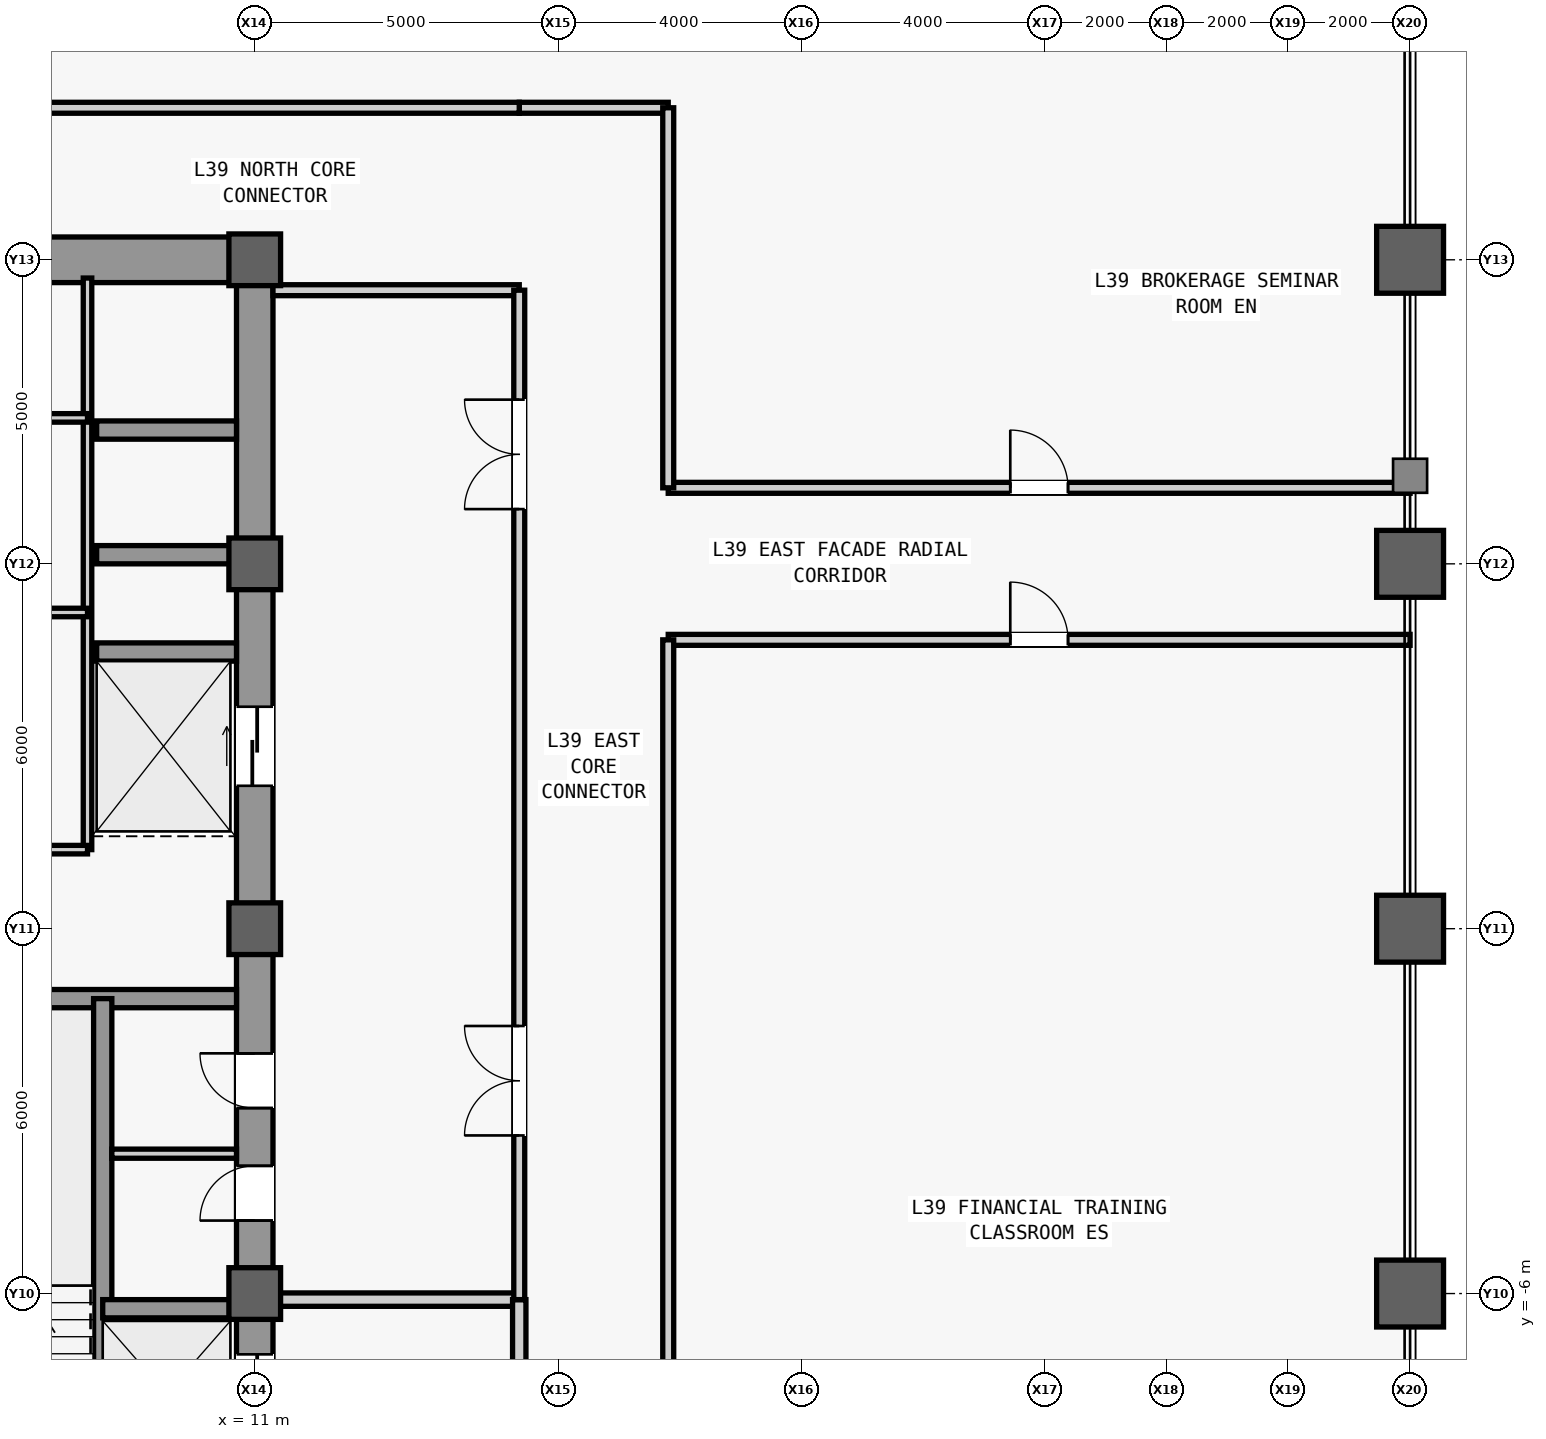
"""IFC4 building model, lengths in metres.
Left out: names, types, materials, properties, quantities, classifications, styles, units other than length and angle.
Written with IfcOpenShell. Run it as: python <this file> out.ifc"""

import sys

from ifc_helpers import new_model, si_unit, direction, frame, frame_2d, origin, origin_2d, place, context, subcontext, project, spatial, rectangle, hollow_rectangle, extrude, source, transform, mapped, element, fill, save


model = new_model("IFC4")
c1 = context("Model", 3, precision=1e-05, world=origin(), true_north=direction((0.0, 1.0)))
c2 = subcontext(c1, "Body", "Model", "MODEL_VIEW")
j1 = project(units=[si_unit("LENGTHUNIT", "METRE"), si_unit("PLANEANGLEUNIT", "RADIAN")], contexts=[c1])
p1 = place(None, origin())
s1 = spatial("IfcSite", under=j1, at=p1, CompositionType="ELEMENT")
p2 = place(p1, origin())
s2 = spatial("IfcBuilding", under=s1, at=p2, CompositionType="ELEMENT")
p3 = place(p2, frame((0.0, 0.0, 171.1)))
s3 = spatial("IfcBuildingStorey", under=s2, at=p3, CompositionType="ELEMENT", Elevation=171.1)
m1 = source(origin(), c2, "Body", "SweptSolid", [
    extrude(rectangle(XDim=22.0, YDim=0.6, at=frame_2d((11.0, 0.0))), origin(), (0.0, 0.0, 1.0), 3.78),
])
p4 = place(p3, frame((11.0, -11.0, 0.0), z_axis=(0.0, 0.0, 1.0), x_axis=(0.0, 1.0, 0.0)))
e1 = element("IfcWall", 1, at=p4, inside=s3, PredefinedType="SHEAR", context=c2, shape_type="MappedRepresentation", body=[
    mapped(m1, transform((0.0, 0.0, 0.0), scale=1.0)),
])
m2 = source(origin(), c2, "Body", "SweptSolid", [
    extrude(rectangle(XDim=1.1, YDim=2.2, at=frame_2d((0.55, 1.1))), frame((0.0, 0.31, 0.0), z_axis=(0.0, -1.0, 0.0), x_axis=(1.0, 0.0, 0.0)), (0.0, 0.0, 1.0), 0.62),
])
p5 = place(p4, frame((0.8, 0.0, 0.0)))
e2 = element("IfcOpeningElement", 2, at=p5, cuts=e1, PredefinedType="OPENING", context=c2, shape_type="MappedRepresentation", body=[
    mapped(m2, transform((0.0, 0.0, 0.0), scale=1.0)),
])
m3 = source(origin(), c2, "Body", "SweptSolid", [
    extrude(rectangle(XDim=0.9, YDim=2.15, at=frame_2d((0.45, 1.075))), frame((0.0, 0.31, 0.0), z_axis=(0.0, -1.0, 0.0), x_axis=(1.0, 0.0, 0.0)), (0.0, 0.0, 1.0), 0.62),
])
p6 = place(p4, frame((6.2, 0.0, 0.0)))
e3 = element("IfcOpeningElement", 3, at=p6, cuts=e1, PredefinedType="OPENING", context=c2, shape_type="MappedRepresentation", body=[
    mapped(m3, transform((0.0, 0.0, 0.0), scale=1.0)),
])
p7 = place(p4, frame((8.05, 0.0, 0.0)))
e4 = element("IfcOpeningElement", 4, at=p7, cuts=e1, PredefinedType="OPENING", context=c2, shape_type="MappedRepresentation", body=[
    mapped(m3, transform((0.0, 0.0, 0.0), scale=1.0)),
])
m4 = source(origin(), c2, "Body", "SweptSolid", [
    extrude(rectangle(XDim=1.3, YDim=2.3, at=frame_2d((0.65, 1.15))), frame((0.0, 0.31, 0.0), z_axis=(0.0, -1.0, 0.0), x_axis=(1.0, 0.0, 0.0)), (0.0, 0.0, 1.0), 0.62),
])
p8 = place(p4, frame((2.7, 0.0, 0.0)))
e5 = element("IfcOpeningElement", 5, at=p8, cuts=e1, PredefinedType="OPENING", context=c2, shape_type="MappedRepresentation", body=[
    mapped(m4, transform((0.0, 0.0, 0.0), scale=1.0)),
])
p9 = place(p4, frame((13.35, 0.0, 0.0)))
e6 = element("IfcOpeningElement", 6, at=p9, cuts=e1, PredefinedType="OPENING", context=c2, shape_type="MappedRepresentation", body=[
    mapped(m4, transform((0.0, 0.0, 0.0), scale=1.0)),
])
m5 = source(origin(), c2, "Body", "SweptSolid", [
    extrude(rectangle(XDim=5.85, YDim=0.75, at=frame_2d((2.925, 0.0))), origin(), (0.0, 0.0, 1.0), 3.78),
])
p10 = place(p3, frame((4.85, 11.0, 0.0), z_axis=(0.0, 0.0, 1.0), x_axis=(1.0, 0.0, 0.0)))
e7 = element("IfcWall", 7, at=p10, inside=s3, PredefinedType="SHEAR", context=c2, shape_type="MappedRepresentation", body=[
    mapped(m5, transform((0.0, 0.0, 0.0), scale=1.0)),
])
m6 = source(origin(), c2, "Body", "SweptSolid", [
    extrude(rectangle(XDim=1.05, YDim=2.2, at=frame_2d((0.525, 1.1))), frame((0.0, 0.385, 0.0), z_axis=(0.0, -1.0, 0.0), x_axis=(1.0, 0.0, 0.0)), (0.0, 0.0, 1.0), 0.77),
])
p11 = place(p10, frame((1.375, 0.0, 0.0)))
e8 = element("IfcOpeningElement", 8, at=p11, cuts=e7, PredefinedType="OPENING", context=c2, shape_type="MappedRepresentation", body=[
    mapped(m6, transform((0.0, 0.0, 0.0), scale=1.0)),
])
m7 = source(origin(), c2, "Body", "SweptSolid", [
    extrude(rectangle(XDim=5.6, YDim=0.3, at=frame_2d((2.8, 0.0))), origin(), (0.0, 0.0, 1.0), 3.78),
])
p12 = place(p3, frame((5.1, -1.15, 0.0), z_axis=(0.0, 0.0, 1.0), x_axis=(1.0, 0.0, 0.0)))
e9 = element("IfcWall", 9, at=p12, inside=s3, PredefinedType="SHEAR", context=c2, shape_type="MappedRepresentation", body=[
    mapped(m7, transform((0.0, 0.0, 0.0), scale=1.0)),
])
m8 = source(origin(), c2, "Body", "SweptSolid", [
    extrude(rectangle(XDim=0.85, YDim=0.85, at=origin_2d()), origin(), (0.0, 0.0, 1.0), 4.0),
])
for number, where, z_axis, x_axis in (
    (10, (11.0, -6.0, 0.0), (0.0, 0.0, 1.0), (1.0, 0.0, 0.0)),
    (11, (11.0, 0.0, 0.0), (0.0, 0.0, 1.0), (1.0, 0.0, 0.0)),
    (12, (11.0, 6.0, 0.0), (0.0, 0.0, 1.0), (1.0, 0.0, 0.0)),
    (13, (11.0, 11.0, 0.0), (0.0, 0.0, 1.0), (1.0, 0.0, 0.0)),
):
    element("IfcColumn", number, at=place(p3, frame(where, z_axis=z_axis, x_axis=x_axis)), inside=s3, PredefinedType="COLUMN", context=c2, shape_type="MappedRepresentation", body=[
        mapped(m8, transform((0.0, 0.0, 0.0), scale=1.0)),
    ])
m9 = source(origin(), c2, "Body", "SweptSolid", [
    extrude(hollow_rectangle(XDim=1.1, YDim=1.1, WallThickness=0.06, at=origin_2d()), origin(), (0.0, 0.0, 1.0), 4.0),
])
for number, where, z_axis, x_axis in (
    (14, (30.0, -6.0, 0.0), (0.0, 0.0, 1.0), (1.0, 0.0, 0.0)),
    (15, (30.0, 0.0, 0.0), (0.0, 0.0, 1.0), (1.0, 0.0, 0.0)),
    (16, (30.0, 6.0, 0.0), (0.0, 0.0, 1.0), (1.0, 0.0, 0.0)),
    (17, (30.0, 11.0, 0.0), (0.0, 0.0, 1.0), (1.0, 0.0, 0.0)),
):
    element("IfcColumn", number, at=place(p3, frame(where, z_axis=z_axis, x_axis=x_axis)), inside=s3, PredefinedType="COLUMN", context=c2, shape_type="MappedRepresentation", body=[
        mapped(m9, transform((0.0, 0.0, 0.0), scale=1.0)),
    ])
m10 = source(origin(), c2, "Body", "SweptSolid", [
    extrude(rectangle(XDim=7.8, YDim=0.3, at=frame_2d((3.9, 0.0))), origin(), (0.0, 0.0, 1.0), 3.78),
])
p13 = place(p3, frame((8.5, -8.95, 0.0), z_axis=(0.0, 0.0, 1.0), x_axis=(0.0, 1.0, 0.0)))
e18 = element("IfcWall", 18, at=p13, inside=s3, PredefinedType="SHEAR", context=c2, shape_type="MappedRepresentation", body=[
    mapped(m10, transform((0.0, 0.0, 0.0), scale=1.0)),
])
m11 = source(origin(), c2, "Body", "SweptSolid", [
    extrude(rectangle(XDim=2.2, YDim=0.3, at=frame_2d((1.1, 0.0))), origin(), (0.0, 0.0, 1.0), 3.78),
])
p14 = place(p3, frame((8.5, -6.25, 0.0), z_axis=(0.0, 0.0, 1.0), x_axis=(1.0, 0.0, 0.0)))
e19 = element("IfcWall", 19, at=p14, inside=s3, PredefinedType="SHEAR", context=c2, shape_type="MappedRepresentation", body=[
    mapped(m11, transform((0.0, 0.0, 0.0), scale=1.0)),
])
m12 = source(origin(), c2, "Body", "SweptSolid", [
    extrude(rectangle(XDim=2.3, YDim=0.3, at=frame_2d((1.15, 0.0))), origin(), (0.0, 0.0, 1.0), 3.78),
])
for number, where, z_axis, x_axis in (
    (20, (8.4, 4.55, 0.0), (0.0, 0.0, 1.0), (1.0, 0.0, 0.0)),
    (21, (8.4, 6.15, 0.0), (0.0, 0.0, 1.0), (1.0, 0.0, 0.0)),
    (22, (8.4, 8.2, 0.0), (0.0, 0.0, 1.0), (1.0, 0.0, 0.0)),
):
    element("IfcWall", number, at=place(p3, frame(where, z_axis=z_axis, x_axis=x_axis)), inside=s3, PredefinedType="SHEAR", context=c2, shape_type="MappedRepresentation", body=[
        mapped(m12, transform((0.0, 0.0, 0.0), scale=1.0)),
    ])
m13 = source(origin(), c2, "Body", "SweptSolid", [
    extrude(rectangle(XDim=2.05, YDim=0.15, at=frame_2d((1.025, 0.0))), origin(), (0.0, 0.0, 1.0), 3.78),
])
p15 = place(p3, frame((8.65, -3.7, 0.0), z_axis=(0.0, 0.0, 1.0), x_axis=(1.0, 0.0, 0.0)))
e23 = element("IfcWall", 23, at=p15, inside=s3, PredefinedType="PARTITIONING", context=c2, shape_type="MappedRepresentation", body=[
    mapped(m13, transform((0.0, 0.0, 0.0), scale=1.0)),
])
m14 = source(origin(), c2, "Body", "SweptSolid", [
    extrude(rectangle(XDim=9.4, YDim=0.14, at=frame_2d((4.7, 0.0))), origin(), (0.0, 0.0, 1.0), 3.78),
])
p16 = place(p3, frame((8.25, 1.3, 0.0), z_axis=(0.0, 0.0, 1.0), x_axis=(0.0, 1.0, 0.0)))
e24 = element("IfcWall", 24, at=p16, inside=s3, PredefinedType="PARTITIONING", context=c2, shape_type="MappedRepresentation", body=[
    mapped(m14, transform((0.0, 0.0, 0.0), scale=1.0)),
])
m15 = source(origin(), c2, "Body", "SweptSolid", [
    extrude(rectangle(XDim=3.15, YDim=0.14, at=frame_2d((1.575, 0.0))), origin(), (0.0, 0.0, 1.0), 3.78),
])
p17 = place(p3, frame((5.1, 1.3, 0.0), z_axis=(0.0, 0.0, 1.0), x_axis=(1.0, 0.0, 0.0)))
e25 = element("IfcWall", 25, at=p17, inside=s3, PredefinedType="PARTITIONING", context=c2, shape_type="MappedRepresentation", body=[
    mapped(m15, transform((0.0, 0.0, 0.0), scale=1.0)),
])
p18 = place(p3, frame((5.1, 8.4, 0.0), z_axis=(0.0, 0.0, 1.0), x_axis=(1.0, 0.0, 0.0)))
e26 = element("IfcWall", 26, at=p18, inside=s3, PredefinedType="PARTITIONING", context=c2, shape_type="MappedRepresentation", body=[
    mapped(m15, transform((0.0, 0.0, 0.0), scale=1.0)),
])
m16 = source(origin(), c2, "Body", "SweptSolid", [
    extrude(rectangle(XDim=0.9, YDim=2.15, at=frame_2d((0.45, 1.075))), frame((0.0, 0.08, 0.0), z_axis=(0.0, -1.0, 0.0), x_axis=(1.0, 0.0, 0.0)), (0.0, 0.0, 1.0), 0.16),
])
p19 = place(p18, frame((1.13, 0.0, 0.0)))
e27 = element("IfcOpeningElement", 27, at=p19, cuts=e26, PredefinedType="OPENING", context=c2, shape_type="MappedRepresentation", body=[
    mapped(m16, transform((0.0, 0.0, 0.0), scale=1.0)),
])
p20 = place(p3, frame((5.1, 5.2, 0.0), z_axis=(0.0, 0.0, 1.0), x_axis=(1.0, 0.0, 0.0)))
e28 = element("IfcWall", 28, at=p20, inside=s3, PredefinedType="PARTITIONING", context=c2, shape_type="MappedRepresentation", body=[
    mapped(m15, transform((0.0, 0.0, 0.0), scale=1.0)),
])
p21 = place(p20, frame((1.13, 0.0, 0.0)))
e29 = element("IfcOpeningElement", 29, at=p21, cuts=e28, PredefinedType="OPENING", context=c2, shape_type="MappedRepresentation", body=[
    mapped(m16, transform((0.0, 0.0, 0.0), scale=1.0)),
])
m17 = source(origin(), c2, "Body", "SweptSolid", [
    extrude(rectangle(XDim=4.05, YDim=0.22, at=frame_2d((2.025, 0.0))), origin(), (0.0, 0.0, 1.0), 3.007),
])
p22 = place(p3, frame((11.3, -6.1, 0.0), z_axis=(0.0, 0.0, 1.0), x_axis=(1.0, 0.0, 0.0)))
e30 = element("IfcWall", 30, at=p22, inside=s3, PredefinedType="PARTITIONING", context=c2, shape_type="MappedRepresentation", body=[
    mapped(m17, transform((0.0, 0.0, 0.0), scale=1.0)),
])
m18 = source(origin(), c2, "Body", "SweptSolid", [
    extrude(rectangle(XDim=4.4, YDim=0.22, at=frame_2d((2.2, 0.0))), origin(), (0.0, 0.0, 1.0), 3.78),
])
p23 = place(p3, frame((15.35, -10.5, 0.0), z_axis=(0.0, 0.0, 1.0), x_axis=(0.0, 1.0, 0.0)))
e31 = element("IfcWall", 31, at=p23, inside=s3, PredefinedType="PARTITIONING", context=c2, shape_type="MappedRepresentation", body=[
    mapped(m18, transform((0.0, 0.0, 0.0), scale=1.0)),
])
m19 = source(origin(), c2, "Body", "SweptSolid", [
    extrude(rectangle(XDim=1.2, YDim=2.2, at=frame_2d((0.6, 1.1))), frame((0.0, 0.12, 0.0), z_axis=(0.0, -1.0, 0.0), x_axis=(1.0, 0.0, 0.0)), (0.0, 0.0, 1.0), 0.24),
])
p24 = place(p23, frame((1.6, 0.0, 0.0)))
e32 = element("IfcOpeningElement", 32, at=p24, cuts=e31, PredefinedType="OPENING", context=c2, shape_type="MappedRepresentation", body=[
    mapped(m19, transform((0.0, 0.0, 0.0), scale=1.0)),
])
m20 = source(origin(), c2, "Body", "SweptSolid", [
    extrude(rectangle(XDim=4.05, YDim=0.18, at=frame_2d((2.025, 0.0))), origin(), (0.0, 0.0, 1.0), 3.78),
])
p25 = place(p3, frame((11.3, 10.5, 0.0), z_axis=(0.0, 0.0, 1.0), x_axis=(1.0, 0.0, 0.0)))
e33 = element("IfcWall", 33, at=p25, inside=s3, PredefinedType="PARTITIONING", context=c2, shape_type="MappedRepresentation", body=[
    mapped(m20, transform((0.0, 0.0, 0.0), scale=1.0)),
])
m21 = source(origin(), c2, "Body", "SweptSolid", [
    extrude(rectangle(XDim=16.6, YDim=0.18, at=frame_2d((8.3, 0.0))), origin(), (0.0, 0.0, 1.0), 3.78),
])
p26 = place(p3, frame((15.35, -6.1, 0.0), z_axis=(0.0, 0.0, 1.0), x_axis=(0.0, 1.0, 0.0)))
e34 = element("IfcWall", 34, at=p26, inside=s3, PredefinedType="PARTITIONING", context=c2, shape_type="MappedRepresentation", body=[
    mapped(m21, transform((0.0, 0.0, 0.0), scale=1.0)),
])
m22 = source(origin(), c2, "Body", "SweptSolid", [
    extrude(rectangle(XDim=1.8, YDim=2.25, at=frame_2d((0.9, 1.125))), frame((0.0, 0.1, 0.0), z_axis=(0.0, -1.0, 0.0), x_axis=(1.0, 0.0, 0.0)), (0.0, 0.0, 1.0), 0.2),
])
p27 = place(p26, frame((2.7, 0.0, 0.0)))
e35 = element("IfcOpeningElement", 35, at=p27, cuts=e34, PredefinedType="OPENING", context=c2, shape_type="MappedRepresentation", body=[
    mapped(m22, transform((0.0, 0.0, 0.0), scale=1.0)),
])
p28 = place(p26, frame((13.0, 0.0, 0.0)))
e36 = element("IfcOpeningElement", 36, at=p28, cuts=e34, PredefinedType="OPENING", context=c2, shape_type="MappedRepresentation", body=[
    mapped(m22, transform((0.0, 0.0, 0.0), scale=1.0)),
])
m23 = source(origin(), c2, "Body", "SweptSolid", [
    extrude(rectangle(XDim=2.45, YDim=0.18, at=frame_2d((1.225, 0.0))), origin(), (0.0, 0.0, 1.0), 3.78),
])
p29 = place(p3, frame((15.35, 13.5, 0.0), z_axis=(0.0, 0.0, 1.0), x_axis=(1.0, 0.0, 0.0)))
e37 = element("IfcWall", 37, at=p29, inside=s3, PredefinedType="PARTITIONING", context=c2, shape_type="MappedRepresentation", body=[
    mapped(m23, transform((0.0, 0.0, 0.0), scale=1.0)),
])
m24 = source(origin(), c2, "Body", "SweptSolid", [
    extrude(rectangle(XDim=7.85, YDim=0.18, at=frame_2d((3.925, 0.0))), origin(), (0.0, 0.0, 1.0), 3.78),
])
p30 = place(p3, frame((7.5, 13.5, 0.0), z_axis=(0.0, 0.0, 1.0), x_axis=(1.0, 0.0, 0.0)))
e38 = element("IfcWall", 38, at=p30, inside=s3, PredefinedType="PARTITIONING", context=c2, shape_type="MappedRepresentation", body=[
    mapped(m24, transform((0.0, 0.0, 0.0), scale=1.0)),
])
m25 = source(origin(), c2, "Body", "SweptSolid", [
    extrude(rectangle(XDim=12.2, YDim=0.18, at=frame_2d((6.1, 0.0))), origin(), (0.0, 0.0, 1.0), 3.78),
])
p31 = place(p3, frame((17.8, 4.75, 0.0), z_axis=(0.0, 0.0, 1.0), x_axis=(1.0, 0.0, 0.0)))
e39 = element("IfcWall", 39, at=p31, inside=s3, PredefinedType="PARTITIONING", context=c2, shape_type="MappedRepresentation", body=[
    mapped(m25, transform((0.0, 0.0, 0.0), scale=1.0)),
])
m26 = source(origin(), c2, "Body", "SweptSolid", [
    extrude(rectangle(XDim=0.95, YDim=2.15, at=frame_2d((0.475, 1.075))), frame((0.0, 0.1, 0.0), z_axis=(0.0, -1.0, 0.0), x_axis=(1.0, 0.0, 0.0)), (0.0, 0.0, 1.0), 0.2),
])
p32 = place(p31, frame((5.625, 0.0, 0.0)))
e40 = element("IfcOpeningElement", 40, at=p32, cuts=e39, PredefinedType="OPENING", context=c2, shape_type="MappedRepresentation", body=[
    mapped(m26, transform((0.0, 0.0, 0.0), scale=1.0)),
])
m27 = source(origin(), c2, "Body", "SweptSolid", [
    extrude(rectangle(XDim=18.95, YDim=0.18, at=frame_2d((9.475, 0.0))), origin(), (0.0, 0.0, 1.0), 3.78),
])
p33 = place(p3, frame((17.8, -14.2, 0.0), z_axis=(0.0, 0.0, 1.0), x_axis=(0.0, 1.0, 0.0)))
e41 = element("IfcWall", 41, at=p33, inside=s3, PredefinedType="PARTITIONING", context=c2, shape_type="MappedRepresentation", body=[
    mapped(m27, transform((0.0, 0.0, 0.0), scale=1.0)),
])
p34 = place(p3, frame((17.8, 7.25, 0.0), z_axis=(0.0, 0.0, 1.0), x_axis=(1.0, 0.0, 0.0)))
e42 = element("IfcWall", 42, at=p34, inside=s3, PredefinedType="PARTITIONING", context=c2, shape_type="MappedRepresentation", body=[
    mapped(m25, transform((0.0, 0.0, 0.0), scale=1.0)),
])
p35 = place(p34, frame((5.625, 0.0, 0.0)))
e43 = element("IfcOpeningElement", 43, at=p35, cuts=e42, PredefinedType="OPENING", context=c2, shape_type="MappedRepresentation", body=[
    mapped(m26, transform((0.0, 0.0, 0.0), scale=1.0)),
])
m28 = source(origin(), c2, "Body", "SweptSolid", [
    extrude(rectangle(XDim=6.25, YDim=0.18, at=frame_2d((3.125, 0.0))), origin(), (0.0, 0.0, 1.0), 3.78),
])
p36 = place(p3, frame((17.8, 7.25, 0.0), z_axis=(0.0, 0.0, 1.0), x_axis=(0.0, 1.0, 0.0)))
e44 = element("IfcWall", 44, at=p36, inside=s3, PredefinedType="PARTITIONING", context=c2, shape_type="MappedRepresentation", body=[
    mapped(m28, transform((0.0, 0.0, 0.0), scale=1.0)),
])
m29 = source(origin(), c2, "Body", "SweptSolid", [
    extrude(rectangle(XDim=0.9, YDim=2.15, at=frame_2d((0.45, 1.075))), frame((0.0, 0.025, 0.0), z_axis=(0.0, -1.0, 0.0), x_axis=(1.0, 0.0, 0.0)), (0.0, 0.0, 1.0), 0.05),
])
p37 = place(p6, origin())
e45 = element("IfcDoor", 45, at=p37, inside=s3, OperationType="SINGLE_SWING_LEFT", PredefinedType="DOOR", context=c2, shape_type="MappedRepresentation", body=[
    mapped(m29, transform((0.0, 0.0, 0.0), scale=1.0)),
])
fill(e3, e45)
p38 = place(p7, origin())
e46 = element("IfcDoor", 46, at=p38, inside=s3, OperationType="SINGLE_SWING_RIGHT", PredefinedType="DOOR", context=c2, shape_type="MappedRepresentation", body=[
    mapped(m29, transform((0.0, 0.0, 0.0), scale=1.0)),
])
fill(e4, e46)
m30 = source(origin(), c2, "Body", "SweptSolid", [
    extrude(rectangle(XDim=1.8, YDim=2.25, at=frame_2d((0.9, 1.125))), frame((0.0, 0.025, 0.0), z_axis=(0.0, -1.0, 0.0), x_axis=(1.0, 0.0, 0.0)), (0.0, 0.0, 1.0), 0.05),
])
p39 = place(p27, origin())
e47 = element("IfcDoor", 47, at=p39, inside=s3, OperationType="SINGLE_SWING_RIGHT", PredefinedType="DOOR", context=c2, shape_type="MappedRepresentation", body=[
    mapped(m30, transform((0.0, 0.0, 0.0), scale=1.0)),
])
fill(e35, e47)
p40 = place(p28, origin())
e48 = element("IfcDoor", 48, at=p40, inside=s3, OperationType="SINGLE_SWING_LEFT", PredefinedType="DOOR", context=c2, shape_type="MappedRepresentation", body=[
    mapped(m30, transform((0.0, 0.0, 0.0), scale=1.0)),
])
fill(e36, e48)
m31 = source(origin(), c2, "Body", "SweptSolid", [
    extrude(rectangle(XDim=0.95, YDim=2.15, at=frame_2d((0.475, 1.075))), frame((0.0, 0.025, 0.0), z_axis=(0.0, -1.0, 0.0), x_axis=(1.0, 0.0, 0.0)), (0.0, 0.0, 1.0), 0.05),
])
p41 = place(p32, origin())
e49 = element("IfcDoor", 49, at=p41, inside=s3, OperationType="SINGLE_SWING_LEFT", PredefinedType="DOOR", context=c2, shape_type="MappedRepresentation", body=[
    mapped(m31, transform((0.0, 0.0, 0.0), scale=1.0)),
])
fill(e40, e49)
p42 = place(p35, origin())
e50 = element("IfcDoor", 50, at=p42, inside=s3, OperationType="SINGLE_SWING_LEFT", PredefinedType="DOOR", context=c2, shape_type="MappedRepresentation", body=[
    mapped(m31, transform((0.0, 0.0, 0.0), scale=1.0)),
])
fill(e43, e50)
m32 = source(origin(), c2, "Body", "SweptSolid", [
    extrude(rectangle(XDim=1.3, YDim=2.3, at=frame_2d((0.65, 1.15))), frame((0.0, 0.025, 0.0), z_axis=(0.0, -1.0, 0.0), x_axis=(1.0, 0.0, 0.0)), (0.0, 0.0, 1.0), 0.05),
])
p43 = place(p8, origin())
e51 = element("IfcDoor", 51, at=p43, inside=s3, OperationType="SLIDING_TO_LEFT", PredefinedType="DOOR", context=c2, shape_type="MappedRepresentation", body=[
    mapped(m32, transform((0.0, 0.0, 0.0), scale=1.0)),
])
fill(e5, e51)
p44 = place(p9, origin())
e52 = element("IfcDoor", 52, at=p44, inside=s3, OperationType="SLIDING_TO_LEFT", PredefinedType="DOOR", context=c2, shape_type="MappedRepresentation", body=[
    mapped(m32, transform((0.0, 0.0, 0.0), scale=1.0)),
])
fill(e6, e52)
save(model, sys.argv[1])
